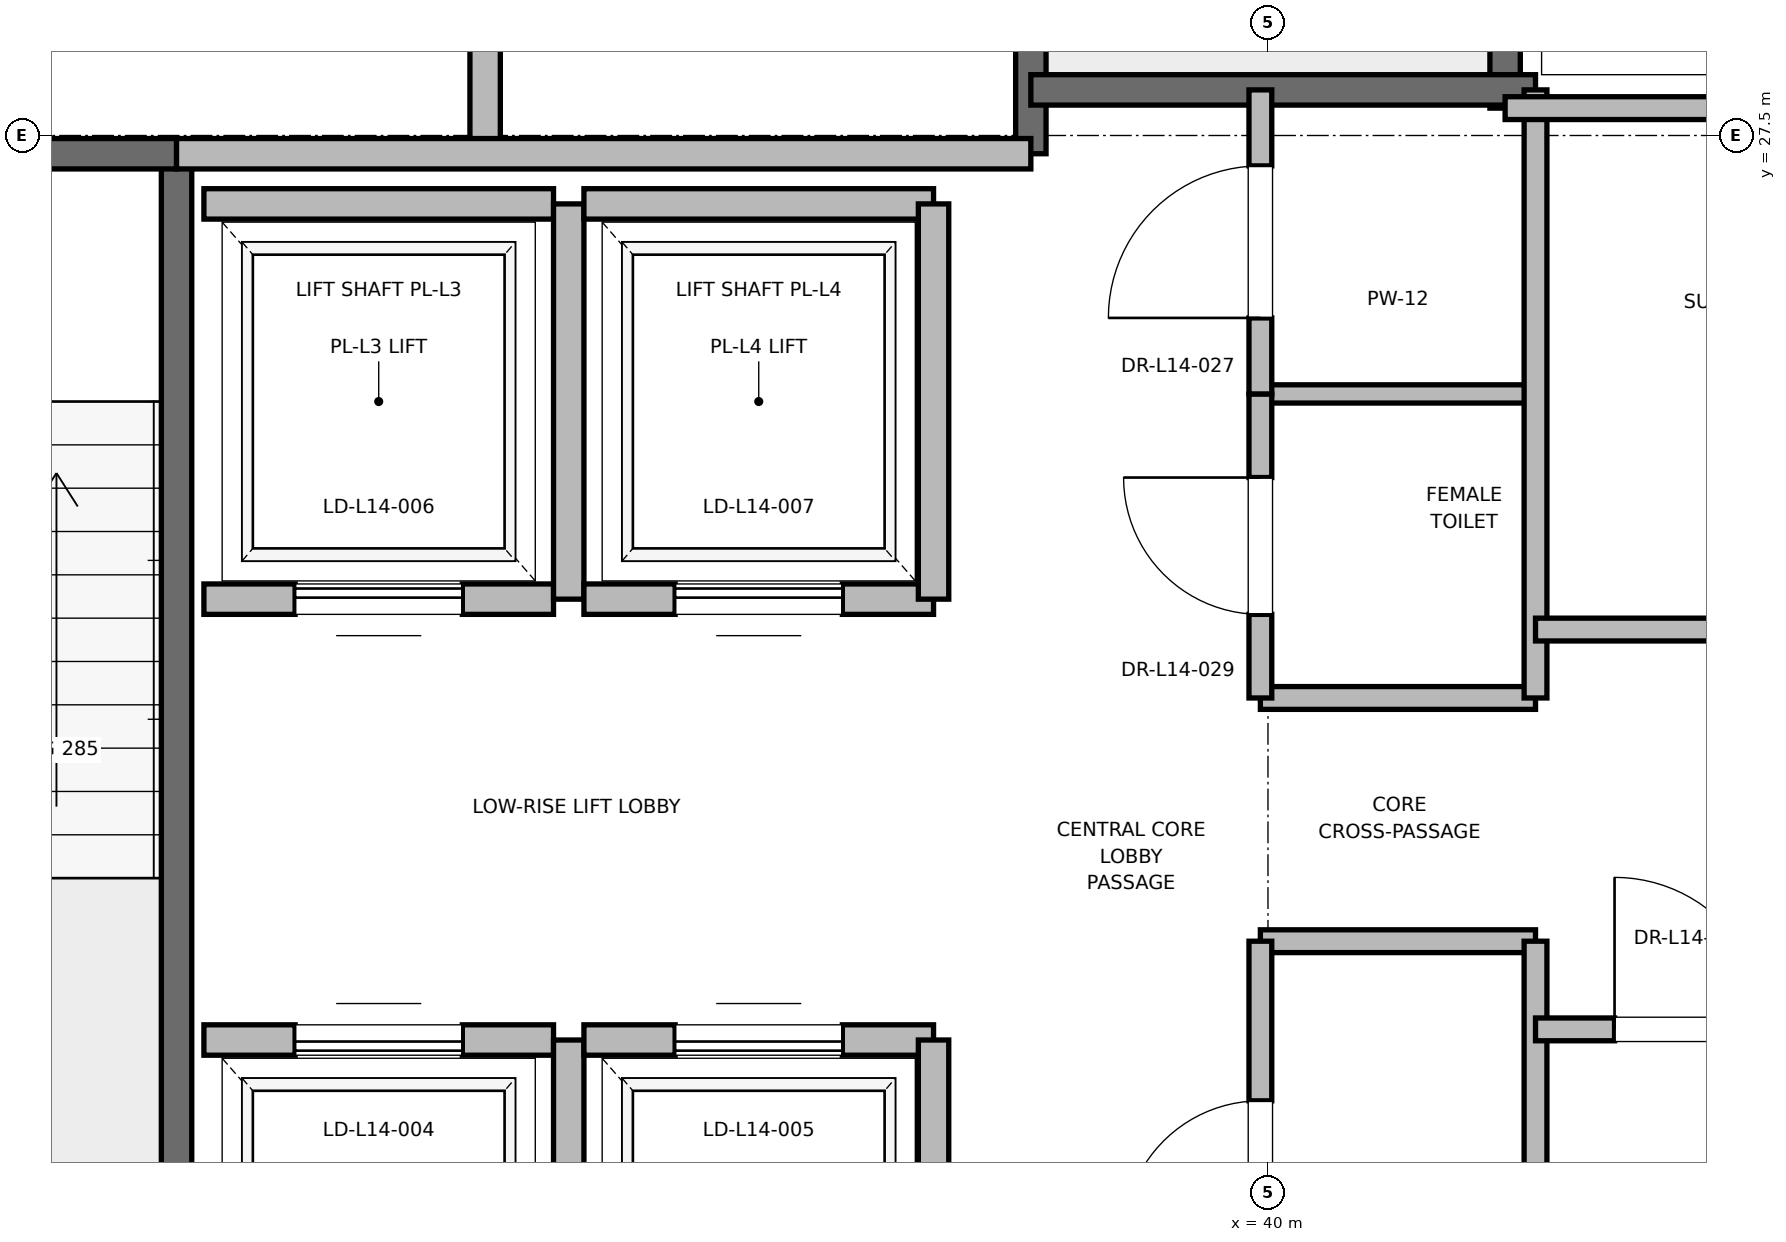
"""IFC4 building model, lengths in metres.
Left out: names, types, materials, properties, quantities, classifications, styles, units other than length and angle.
Written with IfcOpenShell. Run it as: python <this file> out.ifc"""

import sys

from ifc_helpers import new_model, si_unit, direction, frame, frame_2d, origin, place, context, subcontext, project, spatial, rectangle, extrude, element, fill, save


model = new_model("IFC4")
c1 = context("Model", 3, precision=1e-05, world=origin(), true_north=direction((0.0, 1.0)))
c2 = subcontext(c1, "Body", "Model", "MODEL_VIEW")
j1 = project(units=[si_unit("LENGTHUNIT", "METRE"), si_unit("PLANEANGLEUNIT", "RADIAN")], contexts=[c1])
p1 = place(None, origin())
s1 = spatial("IfcSite", under=j1, at=p1, CompositionType="ELEMENT")
p2 = place(p1, origin())
s2 = spatial("IfcBuilding", under=s1, at=p2, CompositionType="ELEMENT")
p3 = place(p2, frame((0.0, 0.0, 63.6)))
s3 = spatial("IfcBuildingStorey", under=s2, at=p3, CompositionType="ELEMENT", Elevation=63.6)
p4 = place(p3, frame((32.82, 18.6, 0.0), z_axis=(0.0, 0.0, 1.0), x_axis=(0.0, 1.0, 0.0)))
e1 = element("IfcWall", 1, at=p4, inside=s3, PredefinedType="SOLIDWALL", context=c2, shape_type="SweptSolid", body=[
    extrude(rectangle(XDim=8.78, YDim=0.2, at=frame_2d((4.39, 0.0))), origin(), (0.0, 0.0, 1.0), 3.76),
])
p5 = place(p3, frame((29.7, 27.38, 0.0), z_axis=(0.0, 0.0, 1.0), x_axis=(1.0, 0.0, 0.0)))
e2 = element("IfcWall", 2, at=p5, inside=s3, PredefinedType="SOLIDWALL", context=c2, shape_type="SweptSolid", body=[
    extrude(rectangle(XDim=3.12, YDim=0.2, at=frame_2d((1.56, 0.0))), origin(), (0.0, 0.0, 1.0), 3.76),
])
p6 = place(p5, frame((1.01, 0.0, 0.0)))
e3 = element("IfcOpeningElement", 3, at=p6, cuts=e2, PredefinedType="OPENING", context=c2, shape_type="SweptSolid", body=[
    extrude(rectangle(XDim=1.1, YDim=2.15, at=frame_2d((0.55, 1.075))), frame((0.0, 0.1, 0.0), z_axis=(0.0, -1.0, 0.0), x_axis=(1.0, 0.0, 0.0)), (0.0, 0.0, 1.0), 0.2),
])
p7 = place(p3, frame((38.44, 27.38, 0.0), z_axis=(0.0, 0.0, 1.0), x_axis=(0.0, 1.0, 0.0)))
e4 = element("IfcWall", 4, at=p7, inside=s3, PredefinedType="SOLIDWALL", context=c2, shape_type="SweptSolid", body=[
    extrude(rectangle(XDim=8.87, YDim=0.2, at=frame_2d((4.435, 0.0))), origin(), (0.0, 0.0, 1.0), 3.76),
])
p8 = place(p3, frame((41.56, 27.68, 0.0), z_axis=(0.0, 0.0, 1.0), x_axis=(0.0, 1.0, 0.0)))
e5 = element("IfcWall", 5, at=p8, inside=s3, PredefinedType="SOLIDWALL", context=c2, shape_type="SweptSolid", body=[
    extrude(rectangle(XDim=8.57, YDim=0.2, at=frame_2d((4.285, 0.0))), origin(), (0.0, 0.0, 1.0), 3.76),
])
p9 = place(p3, frame((38.44, 27.8, 0.0), z_axis=(0.0, 0.0, 1.0), x_axis=(1.0, 0.0, 0.0)))
e6 = element("IfcWall", 6, at=p9, inside=s3, PredefinedType="SOLIDWALL", context=c2, shape_type="SweptSolid", body=[
    extrude(rectangle(XDim=3.32, YDim=0.2, at=frame_2d((1.66, 0.0))), origin(), (0.0, 0.0, 1.0), 3.76),
])
p10 = place(p3, frame((34.85, 27.38, 0.0), z_axis=(0.0, 0.0, 1.0), x_axis=(0.0, 1.0, 0.0)))
e7 = element("IfcWall", 7, at=p10, inside=s3, PredefinedType="PARTITIONING", context=c2, shape_type="SweptSolid", body=[
    extrude(rectangle(XDim=3.37, YDim=0.2, at=frame_2d((1.685, 0.0))), origin(), (0.0, 0.0, 1.0), 3.76),
])
p11 = place(p10, frame((1.11, 0.0, 0.0)))
e8 = element("IfcOpeningElement", 8, at=p11, cuts=e7, PredefinedType="OPENING", context=c2, shape_type="SweptSolid", body=[
    extrude(rectangle(XDim=1.15, YDim=2.2, at=frame_2d((0.575, 1.1))), frame((0.0, 0.1, 0.0), z_axis=(0.0, -1.0, 0.0), x_axis=(1.0, 0.0, 0.0)), (0.0, 0.0, 1.0), 0.2),
])
p12 = place(p3, frame((32.82, 27.38, 0.0), z_axis=(0.0, 0.0, 1.0), x_axis=(1.0, 0.0, 0.0)))
e9 = element("IfcWall", 9, at=p12, inside=s3, PredefinedType="PARTITIONING", context=c2, shape_type="SweptSolid", body=[
    extrude(rectangle(XDim=5.62, YDim=0.2, at=frame_2d((2.81, 0.0))), origin(), (0.0, 0.0, 1.0), 3.76),
])
p13 = place(p3, frame((35.3, 21.55, 0.0), z_axis=(0.0, 0.0, 1.0), x_axis=(-1.0, 0.0, 0.0)))
e10 = element("IfcWall", 10, at=p13, inside=s3, PredefinedType="SOLIDWALL", context=c2, shape_type="SweptSolid", body=[
    extrude(rectangle(XDim=2.3, YDim=0.2, at=frame_2d((1.15, 0.0))), origin(), (0.0, 0.0, 1.0), 3.76),
])
p14 = place(p13, frame((0.6, 0.0, 0.0)))
e11 = element("IfcOpeningElement", 11, at=p14, cuts=e10, PredefinedType="OPENING", context=c2, shape_type="SweptSolid", body=[
    extrude(rectangle(XDim=1.1, YDim=2.2, at=frame_2d((0.55, 1.1))), frame((0.0, 0.1, 0.0), z_axis=(0.0, -1.0, 0.0), x_axis=(1.0, 0.0, 0.0)), (0.0, 0.0, 1.0), 0.2),
])
p15 = place(p3, frame((35.4, 18.95, 0.0), z_axis=(0.0, 0.0, 1.0), x_axis=(0.0, 1.0, 0.0)))
e12 = element("IfcWall", 12, at=p15, inside=s3, PredefinedType="SOLIDWALL", context=c2, shape_type="SweptSolid", body=[
    extrude(rectangle(XDim=2.6, YDim=0.2, at=frame_2d((1.3, 0.0))), origin(), (0.0, 0.0, 1.0), 3.76),
])
p16 = place(p3, frame((37.8, 21.55, 0.0), z_axis=(0.0, 0.0, 1.0), x_axis=(-1.0, 0.0, 0.0)))
e13 = element("IfcWall", 13, at=p16, inside=s3, PredefinedType="SOLIDWALL", context=c2, shape_type="SweptSolid", body=[
    extrude(rectangle(XDim=2.3, YDim=0.2, at=frame_2d((1.15, 0.0))), origin(), (0.0, 0.0, 1.0), 3.76),
])
p17 = place(p16, frame((0.6, 0.0, 0.0)))
e14 = element("IfcOpeningElement", 14, at=p17, cuts=e13, PredefinedType="OPENING", context=c2, shape_type="SweptSolid", body=[
    extrude(rectangle(XDim=1.1, YDim=2.2, at=frame_2d((0.55, 1.1))), frame((0.0, 0.1, 0.0), z_axis=(0.0, -1.0, 0.0), x_axis=(1.0, 0.0, 0.0)), (0.0, 0.0, 1.0), 0.2),
])
p18 = place(p3, frame((37.8, 18.95, 0.0), z_axis=(0.0, 0.0, 1.0), x_axis=(0.0, 1.0, 0.0)))
e15 = element("IfcWall", 15, at=p18, inside=s3, PredefinedType="SOLIDWALL", context=c2, shape_type="SweptSolid", body=[
    extrude(rectangle(XDim=2.6, YDim=0.2, at=frame_2d((1.3, 0.0))), origin(), (0.0, 0.0, 1.0), 2.54),
])
p19 = place(p3, frame((33.0, 24.45, 0.0), z_axis=(0.0, 0.0, 1.0), x_axis=(1.0, 0.0, 0.0)))
e16 = element("IfcWall", 16, at=p19, inside=s3, PredefinedType="SOLIDWALL", context=c2, shape_type="SweptSolid", body=[
    extrude(rectangle(XDim=2.3, YDim=0.2, at=frame_2d((1.15, 0.0))), origin(), (0.0, 0.0, 1.0), 3.76),
])
p20 = place(p19, frame((0.6, 0.0, 0.0)))
e17 = element("IfcOpeningElement", 17, at=p20, cuts=e16, PredefinedType="OPENING", context=c2, shape_type="SweptSolid", body=[
    extrude(rectangle(XDim=1.1, YDim=2.2, at=frame_2d((0.55, 1.1))), frame((0.0, 0.1, 0.0), z_axis=(0.0, -1.0, 0.0), x_axis=(1.0, 0.0, 0.0)), (0.0, 0.0, 1.0), 0.2),
])
p21 = place(p3, frame((35.3, 27.05, 0.0), z_axis=(0.0, 0.0, 1.0), x_axis=(-1.0, 0.0, 0.0)))
e18 = element("IfcWall", 18, at=p21, inside=s3, PredefinedType="SOLIDWALL", context=c2, shape_type="SweptSolid", body=[
    extrude(rectangle(XDim=2.3, YDim=0.2, at=frame_2d((1.15, 0.0))), origin(), (0.0, 0.0, 1.0), 3.76),
])
p22 = place(p3, frame((35.4, 24.45, 0.0), z_axis=(0.0, 0.0, 1.0), x_axis=(0.0, 1.0, 0.0)))
e19 = element("IfcWall", 19, at=p22, inside=s3, PredefinedType="SOLIDWALL", context=c2, shape_type="SweptSolid", body=[
    extrude(rectangle(XDim=2.6, YDim=0.2, at=frame_2d((1.3, 0.0))), origin(), (0.0, 0.0, 1.0), 3.76),
])
p23 = place(p3, frame((35.5, 24.45, 0.0), z_axis=(0.0, 0.0, 1.0), x_axis=(1.0, 0.0, 0.0)))
e20 = element("IfcWall", 20, at=p23, inside=s3, PredefinedType="SOLIDWALL", context=c2, shape_type="SweptSolid", body=[
    extrude(rectangle(XDim=2.3, YDim=0.2, at=frame_2d((1.15, 0.0))), origin(), (0.0, 0.0, 1.0), 3.76),
])
p24 = place(p23, frame((0.6, 0.0, 0.0)))
e21 = element("IfcOpeningElement", 21, at=p24, cuts=e20, PredefinedType="OPENING", context=c2, shape_type="SweptSolid", body=[
    extrude(rectangle(XDim=1.1, YDim=2.2, at=frame_2d((0.55, 1.1))), frame((0.0, 0.1, 0.0), z_axis=(0.0, -1.0, 0.0), x_axis=(1.0, 0.0, 0.0)), (0.0, 0.0, 1.0), 0.2),
])
p25 = place(p3, frame((37.8, 27.05, 0.0), z_axis=(0.0, 0.0, 1.0), x_axis=(-1.0, 0.0, 0.0)))
e22 = element("IfcWall", 22, at=p25, inside=s3, PredefinedType="SOLIDWALL", context=c2, shape_type="SweptSolid", body=[
    extrude(rectangle(XDim=2.3, YDim=0.2, at=frame_2d((1.15, 0.0))), origin(), (0.0, 0.0, 1.0), 3.76),
])
p26 = place(p3, frame((37.8, 24.45, 0.0), z_axis=(0.0, 0.0, 1.0), x_axis=(0.0, 1.0, 0.0)))
e23 = element("IfcWall", 23, at=p26, inside=s3, PredefinedType="SOLIDWALL", context=c2, shape_type="SweptSolid", body=[
    extrude(rectangle(XDim=2.6, YDim=0.2, at=frame_2d((1.3, 0.0))), origin(), (0.0, 0.0, 1.0), 3.76),
])
for number, where, z_axis, x_axis in (
    (24, (39.95, 22.2, 0.0), (0.0, 0.0, 1.0), (1.0, 0.0, 0.0)),
    (25, (39.95, 23.8, 0.0), (0.0, 0.0, 1.0), (1.0, 0.0, 0.0)),
):
    element("IfcWall", number, at=place(p3, frame(where, z_axis=z_axis, x_axis=x_axis)), inside=s3, PredefinedType="PARTITIONING", context=c2, shape_type="SweptSolid", body=[
        extrude(rectangle(XDim=1.81, YDim=0.15, at=frame_2d((0.905, 0.0))), origin(), (0.0, 0.0, 1.0), 2.85),
    ])
p27 = place(p3, frame((39.95, 25.8, 0.0), z_axis=(0.0, 0.0, 1.0), x_axis=(1.0, 0.0, 0.0)))
e26 = element("IfcWall", 26, at=p27, inside=s3, PredefinedType="PARTITIONING", context=c2, shape_type="SweptSolid", body=[
    extrude(rectangle(XDim=1.81, YDim=0.12, at=frame_2d((0.905, 0.0))), origin(), (0.0, 0.0, 1.0), 2.85),
])
p28 = place(p3, frame((41.76, 18.6, 0.0), z_axis=(0.0, 0.0, 1.0), x_axis=(0.0, 1.0, 0.0)))
e27 = element("IfcWall", 27, at=p28, inside=s3, PredefinedType="PARTITIONING", context=c2, shape_type="SweptSolid", body=[
    extrude(rectangle(XDim=3.6, YDim=0.15, at=frame_2d((1.8, 0.0))), origin(), (0.0, 0.0, 1.0), 2.54),
])
p29 = place(p3, frame((41.76, 23.8, 0.0), z_axis=(0.0, 0.0, 1.0), x_axis=(0.0, 1.0, 0.0)))
e28 = element("IfcWall", 28, at=p29, inside=s3, PredefinedType="PARTITIONING", context=c2, shape_type="SweptSolid", body=[
    extrude(rectangle(XDim=4.0, YDim=0.15, at=frame_2d((2.0, 0.0))), origin(), (0.0, 0.0, 1.0), 2.85),
])
p30 = place(p3, frame((39.95, 19.2, 0.0), z_axis=(0.0, 0.0, 1.0), x_axis=(0.0, 1.0, 0.0)))
e29 = element("IfcWall", 29, at=p30, inside=s3, PredefinedType="PARTITIONING", context=c2, shape_type="SweptSolid", body=[
    extrude(rectangle(XDim=3.0, YDim=0.15, at=frame_2d((1.5, 0.0))), origin(), (0.0, 0.0, 1.0), 2.85),
])
p31 = place(p30, frame((1.05, 0.0, 0.0)))
e30 = element("IfcOpeningElement", 30, at=p31, cuts=e29, PredefinedType="OPENING", context=c2, shape_type="SweptSolid", body=[
    extrude(rectangle(XDim=0.9, YDim=2.1, at=frame_2d((0.45, 1.05))), frame((0.0, 0.075, 0.0), z_axis=(0.0, -1.0, 0.0), x_axis=(1.0, 0.0, 0.0)), (0.0, 0.0, 1.0), 0.15),
])
p32 = place(p3, frame((39.95, 23.8, 0.0), z_axis=(0.0, 0.0, 1.0), x_axis=(0.0, 1.0, 0.0)))
e31 = element("IfcWall", 31, at=p32, inside=s3, PredefinedType="PARTITIONING", context=c2, shape_type="SweptSolid", body=[
    extrude(rectangle(XDim=2.0, YDim=0.15, at=frame_2d((1.0, 0.0))), origin(), (0.0, 0.0, 1.0), 2.85),
])
p33 = place(p32, frame((0.55, 0.0, 0.0)))
e32 = element("IfcOpeningElement", 32, at=p33, cuts=e31, PredefinedType="OPENING", context=c2, shape_type="SweptSolid", body=[
    extrude(rectangle(XDim=0.9, YDim=2.1, at=frame_2d((0.45, 1.05))), frame((0.0, 0.075, 0.0), z_axis=(0.0, -1.0, 0.0), x_axis=(1.0, 0.0, 0.0)), (0.0, 0.0, 1.0), 0.15),
])
p34 = place(p3, frame((39.95, 25.8, 0.0), z_axis=(0.0, 0.0, 1.0), x_axis=(0.0, 1.0, 0.0)))
e33 = element("IfcWall", 33, at=p34, inside=s3, PredefinedType="PARTITIONING", context=c2, shape_type="SweptSolid", body=[
    extrude(rectangle(XDim=2.0, YDim=0.15, at=frame_2d((1.0, 0.0))), origin(), (0.0, 0.0, 1.0), 2.85),
])
p35 = place(p34, frame((0.5, 0.0, 0.0)))
e34 = element("IfcOpeningElement", 34, at=p35, cuts=e33, PredefinedType="OPENING", context=c2, shape_type="SweptSolid", body=[
    extrude(rectangle(XDim=1.0, YDim=2.15, at=frame_2d((0.5, 1.075))), frame((0.0, 0.075, 0.0), z_axis=(0.0, -1.0, 0.0), x_axis=(1.0, 0.0, 0.0)), (0.0, 0.0, 1.0), 0.15),
])
p36 = place(p3, frame((41.56, 27.68, 0.0), z_axis=(0.0, 0.0, 1.0), x_axis=(1.0, 0.0, 0.0)))
e35 = element("IfcWall", 35, at=p36, inside=s3, PredefinedType="PARTITIONING", context=c2, shape_type="SweptSolid", body=[
    extrude(rectangle(XDim=3.59, YDim=0.15, at=frame_2d((1.795, 0.0))), origin(), (0.0, 0.0, 1.0), 2.85),
])
p37 = place(p3, frame((41.76, 21.62, 0.0), z_axis=(0.0, 0.0, 1.0), x_axis=(1.0, 0.0, 0.0)))
e36 = element("IfcWall", 36, at=p37, inside=s3, PredefinedType="PARTITIONING", context=c2, shape_type="SweptSolid", body=[
    extrude(rectangle(XDim=2.04, YDim=0.15, at=frame_2d((1.02, 0.0))), origin(), (0.0, 0.0, 1.0), 2.85),
])
p38 = place(p37, frame((0.52, 0.0, 0.0)))
e37 = element("IfcOpeningElement", 37, at=p38, cuts=e36, PredefinedType="OPENING", context=c2, shape_type="SweptSolid", body=[
    extrude(rectangle(XDim=1.0, YDim=2.15, at=frame_2d((0.5, 1.075))), frame((0.0, 0.075, 0.0), z_axis=(0.0, -1.0, 0.0), x_axis=(1.0, 0.0, 0.0)), (0.0, 0.0, 1.0), 0.15),
])
p39 = place(p3, frame((41.76, 24.25, 0.0), z_axis=(0.0, 0.0, 1.0), x_axis=(1.0, 0.0, 0.0)))
e38 = element("IfcWall", 38, at=p39, inside=s3, PredefinedType="PARTITIONING", context=c2, shape_type="SweptSolid", body=[
    extrude(rectangle(XDim=3.39, YDim=0.15, at=frame_2d((1.695, 0.0))), origin(), (0.0, 0.0, 1.0), 2.85),
])
p40 = place(p39, frame((1.255, 0.0, 0.0)))
e39 = element("IfcOpeningElement", 39, at=p40, cuts=e38, PredefinedType="OPENING", context=c2, shape_type="SweptSolid", body=[
    extrude(rectangle(XDim=0.88, YDim=2.1, at=frame_2d((0.44, 1.05))), frame((0.0, 0.075, 0.0), z_axis=(0.0, -1.0, 0.0), x_axis=(1.0, 0.0, 0.0)), (0.0, 0.0, 1.0), 0.15),
])
p41 = place(p14, origin())
e40 = element("IfcDoor", 40, at=p41, inside=s3, OperationType="SLIDING_TO_RIGHT", PredefinedType="DOOR", context=c2, shape_type="SweptSolid", body=[
    extrude(rectangle(XDim=1.1, YDim=2.2, at=frame_2d((0.55, 1.1))), frame((0.0, 0.025, 0.0), z_axis=(0.0, -1.0, 0.0), x_axis=(1.0, 0.0, 0.0)), (0.0, 0.0, 1.0), 0.05),
])
fill(e11, e40)
p42 = place(p17, origin())
e41 = element("IfcDoor", 41, at=p42, inside=s3, OperationType="SLIDING_TO_RIGHT", PredefinedType="DOOR", context=c2, shape_type="SweptSolid", body=[
    extrude(rectangle(XDim=1.1, YDim=2.2, at=frame_2d((0.55, 1.1))), frame((0.0, 0.025, 0.0), z_axis=(0.0, -1.0, 0.0), x_axis=(1.0, 0.0, 0.0)), (0.0, 0.0, 1.0), 0.05),
])
fill(e14, e41)
p43 = place(p20, origin())
e42 = element("IfcDoor", 42, at=p43, inside=s3, OperationType="SLIDING_TO_RIGHT", PredefinedType="DOOR", context=c2, shape_type="SweptSolid", body=[
    extrude(rectangle(XDim=1.1, YDim=2.2, at=frame_2d((0.55, 1.1))), frame((0.0, 0.025, 0.0), z_axis=(0.0, -1.0, 0.0), x_axis=(1.0, 0.0, 0.0)), (0.0, 0.0, 1.0), 0.05),
])
fill(e17, e42)
p44 = place(p24, origin())
e43 = element("IfcDoor", 43, at=p44, inside=s3, OperationType="SLIDING_TO_RIGHT", PredefinedType="DOOR", context=c2, shape_type="SweptSolid", body=[
    extrude(rectangle(XDim=1.1, YDim=2.2, at=frame_2d((0.55, 1.1))), frame((0.0, 0.025, 0.0), z_axis=(0.0, -1.0, 0.0), x_axis=(1.0, 0.0, 0.0)), (0.0, 0.0, 1.0), 0.05),
])
fill(e21, e43)
p45 = place(p31, origin())
e44 = element("IfcDoor", 44, at=p45, inside=s3, OperationType="SINGLE_SWING_LEFT", PredefinedType="DOOR", context=c2, shape_type="SweptSolid", body=[
    extrude(rectangle(XDim=0.9, YDim=2.1, at=frame_2d((0.45, 1.05))), frame((0.0, 0.025, 0.0), z_axis=(0.0, -1.0, 0.0), x_axis=(1.0, 0.0, 0.0)), (0.0, 0.0, 1.0), 0.05),
])
fill(e30, e44)
p46 = place(p33, origin())
e45 = element("IfcDoor", 45, at=p46, inside=s3, OperationType="SINGLE_SWING_RIGHT", PredefinedType="DOOR", context=c2, shape_type="SweptSolid", body=[
    extrude(rectangle(XDim=0.9, YDim=2.1, at=frame_2d((0.45, 1.05))), frame((0.0, 0.025, 0.0), z_axis=(0.0, -1.0, 0.0), x_axis=(1.0, 0.0, 0.0)), (0.0, 0.0, 1.0), 0.05),
])
fill(e32, e45)
p47 = place(p35, origin())
e46 = element("IfcDoor", 46, at=p47, inside=s3, OperationType="SINGLE_SWING_LEFT", PredefinedType="DOOR", context=c2, shape_type="SweptSolid", body=[
    extrude(rectangle(XDim=1.0, YDim=2.15, at=frame_2d((0.5, 1.075))), frame((0.0, 0.025, 0.0), z_axis=(0.0, -1.0, 0.0), x_axis=(1.0, 0.0, 0.0)), (0.0, 0.0, 1.0), 0.05),
])
fill(e34, e46)
p48 = place(p38, origin())
e47 = element("IfcDoor", 47, at=p48, inside=s3, OperationType="SINGLE_SWING_LEFT", PredefinedType="DOOR", context=c2, shape_type="SweptSolid", body=[
    extrude(rectangle(XDim=1.0, YDim=2.15, at=frame_2d((0.5, 1.075))), frame((0.0, 0.025, 0.0), z_axis=(0.0, -1.0, 0.0), x_axis=(1.0, 0.0, 0.0)), (0.0, 0.0, 1.0), 0.05),
])
fill(e37, e47)
save(model, sys.argv[1])
